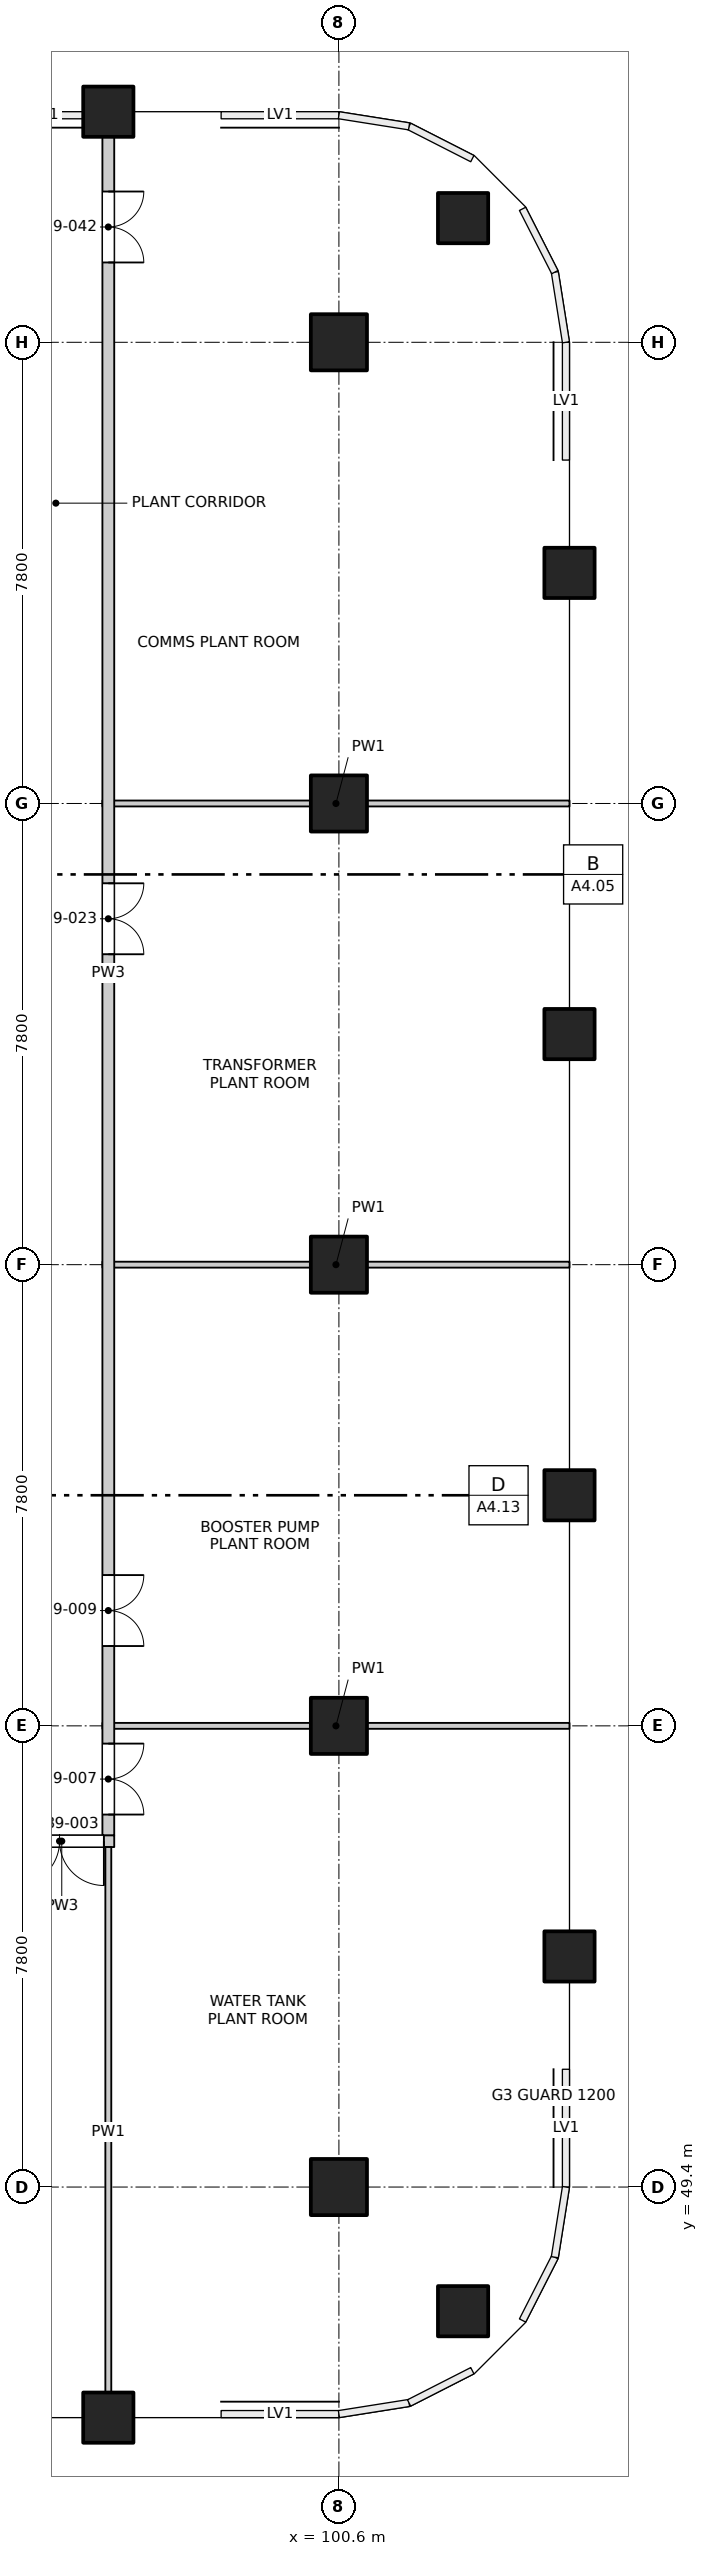
"""IFC4 building model, lengths in metres.
Left out: names, types, materials, properties, quantities, classifications, styles, units other than length and angle.
Written with IfcOpenShell. Run it as: python <this file> out.ifc"""

import sys

from ifc_helpers import new_model, si_unit, direction, frame, frame_2d, origin, origin_2d, place, context, subcontext, project, spatial, rectangle, extrude, element, fill, save


model = new_model("IFC4")
c1 = context("Model", 3, precision=1e-05, world=origin(), true_north=direction((0.0, 1.0)))
c2 = subcontext(c1, "Body", "Model", "MODEL_VIEW")
j1 = project(units=[si_unit("LENGTHUNIT", "METRE"), si_unit("PLANEANGLEUNIT", "RADIAN")], contexts=[c1])
p1 = place(None, origin())
s1 = spatial("IfcSite", under=j1, at=p1, CompositionType="ELEMENT")
p2 = place(p1, origin())
s2 = spatial("IfcBuilding", under=s1, at=p2, CompositionType="ELEMENT")
p3 = place(p2, frame((0.0, 0.0, 144.1)))
s3 = spatial("IfcBuildingStorey", under=s2, at=p3, CompositionType="ELEMENT", Elevation=144.1)
for number, where, z_axis, x_axis in (
    (1, (102.7, 47.3, -0.3), (0.0, 0.0, 1.0), (1.0, 0.0, 0.0)),
    (2, (102.7, 82.7, -0.3), (0.0, 0.0, 1.0), (1.0, 0.0, 0.0)),
    (3, (104.5, 53.3, -0.3), (0.0, 0.0, 1.0), (1.0, 0.0, 0.0)),
    (4, (104.5, 61.1, -0.3), (0.0, 0.0, 1.0), (1.0, 0.0, 0.0)),
    (5, (104.5, 68.9, -0.3), (0.0, 0.0, 1.0), (1.0, 0.0, 0.0)),
    (6, (104.5, 76.7, -0.3), (0.0, 0.0, 1.0), (1.0, 0.0, 0.0)),
    (7, (96.7, 45.5, -0.3), (0.0, 0.0, 1.0), (1.0, 0.0, 0.0)),
    (8, (96.7, 84.5, -0.3), (0.0, 0.0, 1.0), (1.0, 0.0, 0.0)),
):
    element("IfcColumn", number, at=place(p3, frame(where, z_axis=z_axis, x_axis=x_axis)), inside=s3, PredefinedType="COLUMN", context=c2, shape_type="SweptSolid", body=[
        extrude(rectangle(XDim=0.85, YDim=0.85, at=origin_2d()), origin(), (0.0, 0.0, 1.0), 4.5),
    ])
for number, where, z_axis, x_axis in (
    (9, (100.6, 49.4, -0.3), (0.0, 0.0, 1.0), (1.0, 0.0, 0.0)),
    (10, (100.6, 57.2, -0.3), (0.0, 0.0, 1.0), (1.0, 0.0, 0.0)),
    (11, (100.6, 65.0, -0.3), (0.0, 0.0, 1.0), (1.0, 0.0, 0.0)),
    (12, (100.6, 72.8, -0.3), (0.0, 0.0, 1.0), (1.0, 0.0, 0.0)),
    (13, (100.6, 80.6, -0.3), (0.0, 0.0, 1.0), (1.0, 0.0, 0.0)),
):
    element("IfcColumn", number, at=place(p3, frame(where, z_axis=z_axis, x_axis=x_axis)), inside=s3, PredefinedType="COLUMN", context=c2, shape_type="SweptSolid", body=[
        extrude(rectangle(XDim=0.95, YDim=0.95, at=origin_2d()), origin(), (0.0, 0.0, 1.0), 4.5),
    ])
p4 = place(p3, frame((95.025, 55.25, 0.0), z_axis=(0.0, 0.0, 1.0), x_axis=(1.0, 0.0, 0.0)))
e14 = element("IfcWall", 14, at=p4, inside=s3, PredefinedType="PARTITIONING", context=c2, shape_type="SweptSolid", body=[
    extrude(rectangle(XDim=1.775, YDim=0.2, at=frame_2d((0.887, 0.0))), origin(), (0.0, 0.0, 1.0), 4.2),
])
p5 = place(p4, frame((0.1, 0.0, 0.0)))
e15 = element("IfcOpeningElement", 15, at=p5, cuts=e14, PredefinedType="OPENING", context=c2, shape_type="SweptSolid", body=[
    extrude(rectangle(XDim=1.5, YDim=2.1, at=frame_2d((0.75, 1.05))), frame((0.0, 0.11, 0.0), z_axis=(0.0, -1.0, 0.0), x_axis=(1.0, 0.0, 0.0)), (0.0, 0.0, 1.0), 0.22),
])
for number, where, z_axis, x_axis in (
    (16, (96.6, 57.2, 0.0), (0.0, 0.0, 1.0), (1.0, 0.0, 0.0)),
    (17, (96.6, 65.0, 0.0), (0.0, 0.0, 1.0), (1.0, 0.0, 0.0)),
    (18, (96.6, 72.8, 0.0), (0.0, 0.0, 1.0), (1.0, 0.0, 0.0)),
):
    element("IfcWall", number, at=place(p3, frame(where, z_axis=z_axis, x_axis=x_axis)), inside=s3, PredefinedType="PARTITIONING", context=c2, shape_type="SweptSolid", body=[
        extrude(rectangle(XDim=7.9, YDim=0.1, at=frame_2d((3.95, 0.0))), origin(), (0.0, 0.0, 1.0), 4.2),
    ])
p6 = place(p3, frame((96.7, 45.5, 0.0), z_axis=(0.0, 0.0, 1.0), x_axis=(0.0, 1.0, 0.0)))
e19 = element("IfcWall", 19, at=p6, inside=s3, PredefinedType="PARTITIONING", context=c2, shape_type="SweptSolid", body=[
    extrude(rectangle(XDim=9.65, YDim=0.1, at=frame_2d((4.825, 0.0))), origin(), (0.0, 0.0, 1.0), 4.2),
])
p7 = place(p3, frame((96.7, 55.35, 0.0), z_axis=(0.0, 0.0, 1.0), x_axis=(0.0, 1.0, 0.0)))
e20 = element("IfcWall", 20, at=p7, inside=s3, PredefinedType="PARTITIONING", context=c2, shape_type="SweptSolid", body=[
    extrude(rectangle(XDim=29.15, YDim=0.2, at=frame_2d((14.575, 0.0))), origin(), (0.0, 0.0, 1.0), 4.2),
])
p8 = place(p7, frame((0.35, 0.0, 0.0)))
e21 = element("IfcOpeningElement", 21, at=p8, cuts=e20, PredefinedType="OPENING", context=c2, shape_type="SweptSolid", body=[
    extrude(rectangle(XDim=1.2, YDim=2.1, at=frame_2d((0.6, 1.05))), frame((0.0, 0.11, 0.0), z_axis=(0.0, -1.0, 0.0), x_axis=(1.0, 0.0, 0.0)), (0.0, 0.0, 1.0), 0.22),
])
p9 = place(p7, frame((3.2, 0.0, 0.0)))
e22 = element("IfcOpeningElement", 22, at=p9, cuts=e20, PredefinedType="OPENING", context=c2, shape_type="SweptSolid", body=[
    extrude(rectangle(XDim=1.2, YDim=2.1, at=frame_2d((0.6, 1.05))), frame((0.0, 0.11, 0.0), z_axis=(0.0, -1.0, 0.0), x_axis=(1.0, 0.0, 0.0)), (0.0, 0.0, 1.0), 0.22),
])
p10 = place(p7, frame((14.9, 0.0, 0.0)))
e23 = element("IfcOpeningElement", 23, at=p10, cuts=e20, PredefinedType="OPENING", context=c2, shape_type="SweptSolid", body=[
    extrude(rectangle(XDim=1.2, YDim=2.1, at=frame_2d((0.6, 1.05))), frame((0.0, 0.11, 0.0), z_axis=(0.0, -1.0, 0.0), x_axis=(1.0, 0.0, 0.0)), (0.0, 0.0, 1.0), 0.22),
])
p11 = place(p7, frame((26.6, 0.0, 0.0)))
e24 = element("IfcOpeningElement", 24, at=p11, cuts=e20, PredefinedType="OPENING", context=c2, shape_type="SweptSolid", body=[
    extrude(rectangle(XDim=1.2, YDim=2.1, at=frame_2d((0.6, 1.05))), frame((0.0, 0.11, 0.0), z_axis=(0.0, -1.0, 0.0), x_axis=(1.0, 0.0, 0.0)), (0.0, 0.0, 1.0), 0.22),
])
p12 = place(p5, origin())
e25 = element("IfcDoor", 25, at=p12, inside=s3, OperationType="DOUBLE_DOOR_SINGLE_SWING", PredefinedType="DOOR", context=c2, shape_type="SweptSolid", body=[
    extrude(rectangle(XDim=1.5, YDim=2.1, at=frame_2d((0.75, 1.05))), frame((0.0, 0.025, 0.0), z_axis=(0.0, -1.0, 0.0), x_axis=(1.0, 0.0, 0.0)), (0.0, 0.0, 1.0), 0.05),
])
fill(e15, e25)
p13 = place(p8, origin())
e26 = element("IfcDoor", 26, at=p13, inside=s3, OperationType="DOUBLE_DOOR_SINGLE_SWING", PredefinedType="DOOR", context=c2, shape_type="SweptSolid", body=[
    extrude(rectangle(XDim=1.2, YDim=2.1, at=frame_2d((0.6, 1.05))), frame((0.0, 0.025, 0.0), z_axis=(0.0, -1.0, 0.0), x_axis=(1.0, 0.0, 0.0)), (0.0, 0.0, 1.0), 0.05),
])
fill(e21, e26)
p14 = place(p9, origin())
e27 = element("IfcDoor", 27, at=p14, inside=s3, OperationType="DOUBLE_DOOR_SINGLE_SWING", PredefinedType="DOOR", context=c2, shape_type="SweptSolid", body=[
    extrude(rectangle(XDim=1.2, YDim=2.1, at=frame_2d((0.6, 1.05))), frame((0.0, 0.025, 0.0), z_axis=(0.0, -1.0, 0.0), x_axis=(1.0, 0.0, 0.0)), (0.0, 0.0, 1.0), 0.05),
])
fill(e22, e27)
p15 = place(p10, origin())
e28 = element("IfcDoor", 28, at=p15, inside=s3, OperationType="DOUBLE_DOOR_SINGLE_SWING", PredefinedType="DOOR", context=c2, shape_type="SweptSolid", body=[
    extrude(rectangle(XDim=1.2, YDim=2.1, at=frame_2d((0.6, 1.05))), frame((0.0, 0.025, 0.0), z_axis=(0.0, -1.0, 0.0), x_axis=(1.0, 0.0, 0.0)), (0.0, 0.0, 1.0), 0.05),
])
fill(e23, e28)
p16 = place(p11, origin())
e29 = element("IfcDoor", 29, at=p16, inside=s3, OperationType="DOUBLE_DOOR_SINGLE_SWING", PredefinedType="DOOR", context=c2, shape_type="SweptSolid", body=[
    extrude(rectangle(XDim=1.2, YDim=2.1, at=frame_2d((0.6, 1.05))), frame((0.0, 0.025, 0.0), z_axis=(0.0, -1.0, 0.0), x_axis=(1.0, 0.0, 0.0)), (0.0, 0.0, 1.0), 0.05),
])
fill(e24, e29)
save(model, sys.argv[1])
